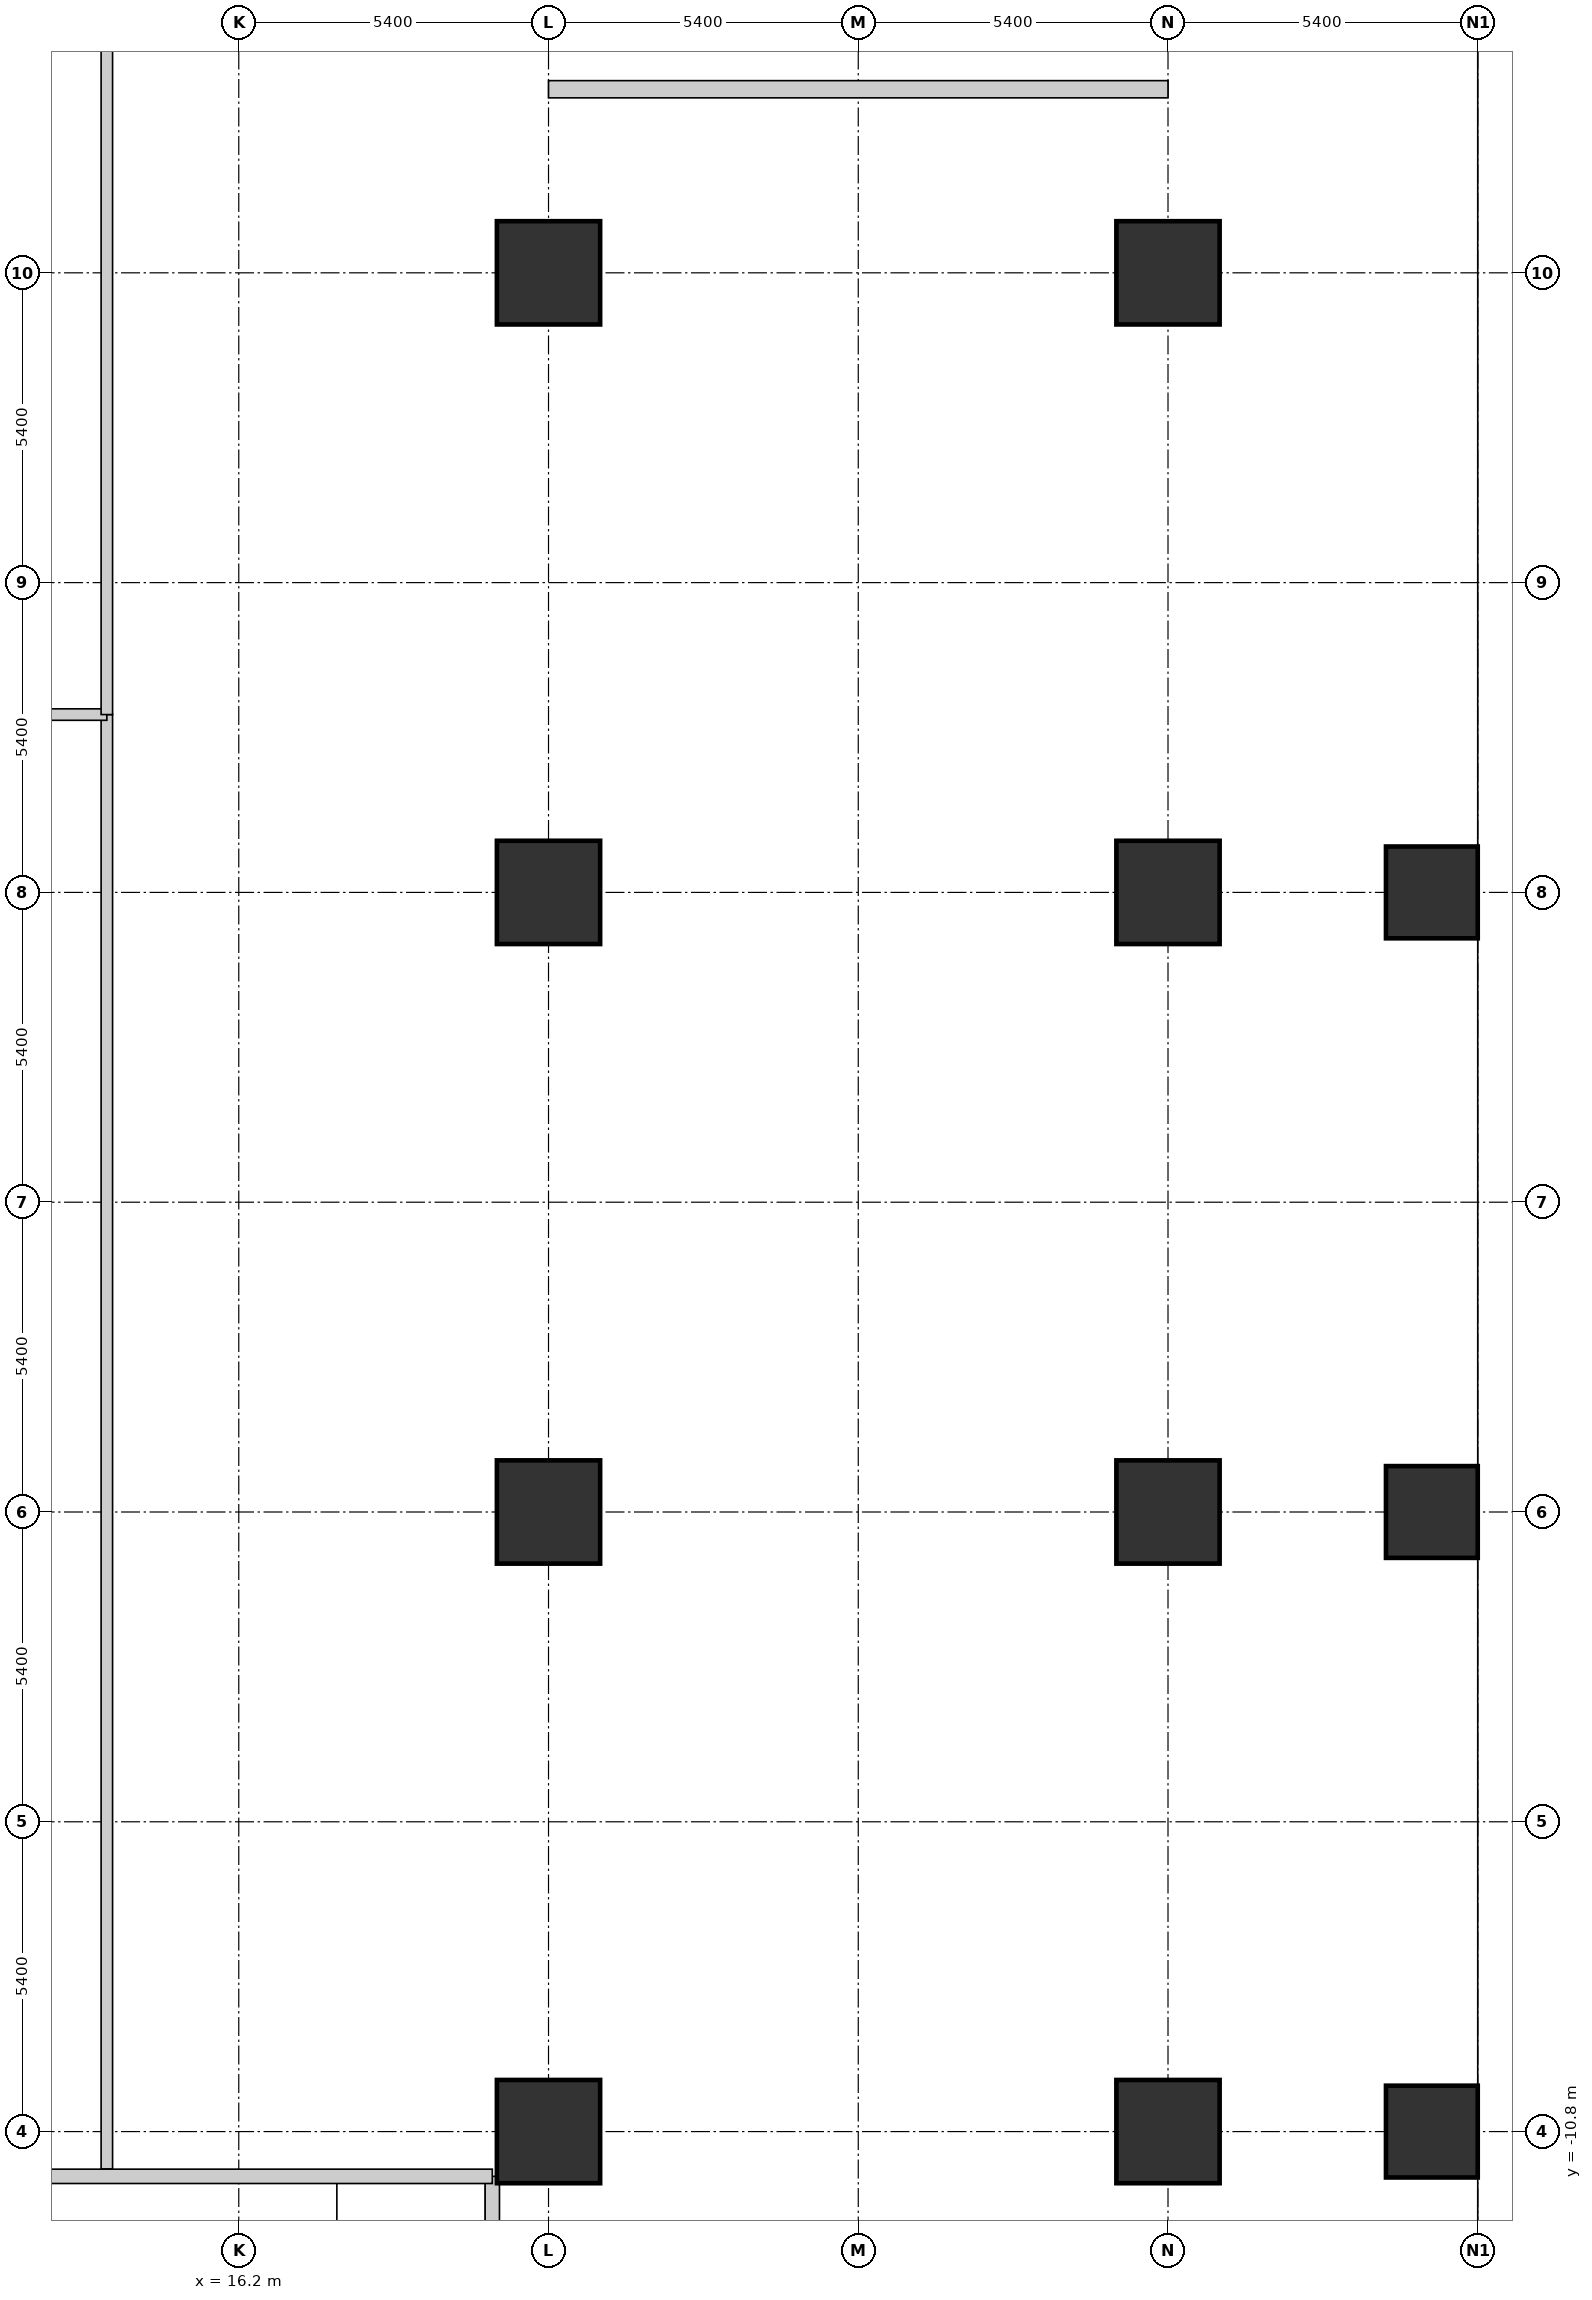
"""IFC4 building model, lengths in metres.
Left out: names, types, materials, properties, quantities, classifications, styles, units other than length and angle.
Written with IfcOpenShell. Run it as: python <this file> out.ifc"""

import sys

from ifc_helpers import new_model, si_unit, direction, frame, frame_2d, origin, origin_2d, place, context, subcontext, project, spatial, rectangle, circle, extrude, element, fill, save


model = new_model("IFC4")
c1 = context("Model", 3, precision=1e-05, world=origin(), true_north=direction((0.0, 1.0)))
c2 = subcontext(c1, "Body", "Model", "MODEL_VIEW")
j1 = project(units=[si_unit("LENGTHUNIT", "METRE"), si_unit("PLANEANGLEUNIT", "RADIAN")], contexts=[c1])
p1 = place(None, origin())
s1 = spatial("IfcSite", under=j1, at=p1, CompositionType="ELEMENT")
p2 = place(p1, origin())
s2 = spatial("IfcBuilding", under=s1, at=p2, CompositionType="ELEMENT")
p3 = place(p2, frame((0.0, 0.0, 9.0)))
s3 = spatial("IfcBuildingStorey", under=s2, at=p3, CompositionType="ELEMENT", Elevation=9.0)
for number, where, z_axis, x_axis in (
    (1, (21.6, -10.8, 0.0), (0.0, 0.0, 1.0), (1.0, 0.0, 0.0)),
    (2, (21.6, 0.0, 0.0), (0.0, 0.0, 1.0), (1.0, 0.0, 0.0)),
    (3, (21.6, 10.8, 0.0), (0.0, 0.0, 1.0), (1.0, 0.0, 0.0)),
    (4, (21.6, 21.6, 0.0), (0.0, 0.0, 1.0), (1.0, 0.0, 0.0)),
    (5, (32.4, -10.8, 0.0), (0.0, 0.0, 1.0), (1.0, 0.0, 0.0)),
    (6, (32.4, 0.0, 0.0), (0.0, 0.0, 1.0), (1.0, 0.0, 0.0)),
    (7, (32.4, 10.8, 0.0), (0.0, 0.0, 1.0), (1.0, 0.0, 0.0)),
    (8, (32.4, 21.6, 0.0), (0.0, 0.0, 1.0), (1.0, 0.0, 0.0)),
):
    element("IfcColumn", number, at=place(p3, frame(where, z_axis=z_axis, x_axis=x_axis)), inside=s3, PredefinedType="COLUMN", context=c2, shape_type="SweptSolid", body=[
        extrude(circle(Radius=0.9, at=origin_2d()), origin(), (0.0, 0.0, 1.0), 4.5),
    ])
for number, where, z_axis, x_axis in (
    (9, (37.0, -10.8, 0.0), (0.0, 0.0, 1.0), (1.0, 0.0, 0.0)),
    (10, (37.0, 0.0, 0.0), (0.0, 0.0, 1.0), (1.0, 0.0, 0.0)),
    (11, (37.0, 10.8, 0.0), (0.0, 0.0, 1.0), (1.0, 0.0, 0.0)),
):
    element("IfcColumn", number, at=place(p3, frame(where, z_axis=z_axis, x_axis=x_axis)), inside=s3, PredefinedType="COLUMN", context=c2, shape_type="SweptSolid", body=[
        extrude(rectangle(XDim=1.6, YDim=1.6, at=origin_2d()), origin(), (0.0, 0.0, 1.0), 4.5),
    ])
p4 = place(p3, frame((21.6, 24.8, 0.0), z_axis=(0.0, 0.0, 1.0), x_axis=(1.0, 0.0, 0.0)))
e12 = element("IfcWall", 12, at=p4, inside=s3, PredefinedType="STANDARD", context=c2, shape_type="SweptSolid", body=[
    extrude(rectangle(XDim=10.8, YDim=0.3, at=frame_2d((5.4, 0.0))), origin(), (0.0, 0.0, 1.0), 4.25),
])
p5 = place(p4, frame((4.35, 0.0, 0.85)))
e13 = element("IfcOpeningElement", 13, at=p5, cuts=e12, PredefinedType="OPENING", context=c2, shape_type="SweptSolid", body=[
    extrude(rectangle(XDim=2.1, YDim=1.8, at=frame_2d((1.05, 0.9))), frame((0.0, 0.16, 0.0), z_axis=(0.0, -1.0, 0.0), x_axis=(1.0, 0.0, 0.0)), (0.0, 0.0, 1.0), 0.32),
])
p6 = place(p3, frame((20.62, -15.52, 0.0), z_axis=(0.0, 0.0, 1.0), x_axis=(0.0, 1.0, 0.0)))
e14 = element("IfcWall", 14, at=p6, inside=s3, PredefinedType="SHEAR", context=c2, shape_type="SweptSolid", body=[
    extrude(rectangle(XDim=3.94, YDim=0.25, at=frame_2d((1.97, 0.0))), origin(), (0.0, 0.0, 1.0), 4.5),
])
p7 = place(p3, frame((12.68, -11.58, 0.0), z_axis=(0.0, 0.0, 1.0), x_axis=(1.0, 0.0, 0.0)))
e15 = element("IfcWall", 15, at=p7, inside=s3, PredefinedType="SHEAR", context=c2, shape_type="SweptSolid", body=[
    extrude(rectangle(XDim=7.94, YDim=0.25, at=frame_2d((3.97, 0.0))), origin(), (0.0, 0.0, 1.0), 4.5),
])
p8 = place(p3, frame((13.9, -11.45, 0.0), z_axis=(0.0, 0.0, 1.0), x_axis=(0.0, 1.0, 0.0)))
e16 = element("IfcWall", 16, at=p8, inside=s3, PredefinedType="PARTITIONING", context=c2, shape_type="SweptSolid", body=[
    extrude(rectangle(XDim=25.35, YDim=0.2, at=frame_2d((12.675, 0.0))), origin(), (0.0, 0.0, 1.0), 3.379),
])
p9 = place(p8, frame((10.0, 0.0, 0.0)))
e17 = element("IfcOpeningElement", 17, at=p9, cuts=e16, PredefinedType="OPENING", context=c2, shape_type="SweptSolid", body=[
    extrude(rectangle(XDim=1.1, YDim=2.1, at=frame_2d((0.55, 1.05))), frame((0.0, 0.11, 0.0), z_axis=(0.0, -1.0, 0.0), x_axis=(1.0, 0.0, 0.0)), (0.0, 0.0, 1.0), 0.22),
])
p10 = place(p3, frame((-13.9, 13.9, 0.0), z_axis=(0.0, 0.0, 1.0), x_axis=(1.0, 0.0, 0.0)))
e18 = element("IfcWall", 18, at=p10, inside=s3, PredefinedType="PARTITIONING", context=c2, shape_type="SweptSolid", body=[
    extrude(rectangle(XDim=27.8, YDim=0.2, at=frame_2d((13.9, 0.0))), origin(), (0.0, 0.0, 1.0), 3.379),
])
p11 = place(p10, frame((3.5, 0.0, 0.0)))
e19 = element("IfcOpeningElement", 19, at=p11, cuts=e18, PredefinedType="OPENING", context=c2, shape_type="SweptSolid", body=[
    extrude(rectangle(XDim=1.1, YDim=2.1, at=frame_2d((0.55, 1.05))), frame((0.0, 0.11, 0.0), z_axis=(0.0, -1.0, 0.0), x_axis=(1.0, 0.0, 0.0)), (0.0, 0.0, 1.0), 0.22),
])
p12 = place(p10, frame((21.0, 0.0, 0.0)))
e20 = element("IfcOpeningElement", 20, at=p12, cuts=e18, PredefinedType="OPENING", context=c2, shape_type="SweptSolid", body=[
    extrude(rectangle(XDim=1.1, YDim=2.1, at=frame_2d((0.55, 1.05))), frame((0.0, 0.11, 0.0), z_axis=(0.0, -1.0, 0.0), x_axis=(1.0, 0.0, 0.0)), (0.0, 0.0, 1.0), 0.22),
])
p13 = place(p3, frame((13.9, 13.9, 0.0), z_axis=(0.0, 0.0, 1.0), x_axis=(0.0, 1.0, 0.0)))
e21 = element("IfcWall", 21, at=p13, inside=s3, PredefinedType="PARTITIONING", context=c2, shape_type="SweptSolid", body=[
    extrude(rectangle(XDim=11.96, YDim=0.2, at=frame_2d((5.98, 0.0))), origin(), (0.0, 0.0, 1.0), 3.379),
])
p14 = place(p5, origin())
e22 = element("IfcWindow", 22, at=p14, inside=s3, PartitioningType="SINGLE_PANEL", PredefinedType="WINDOW", context=c2, shape_type="SweptSolid", body=[
    extrude(rectangle(XDim=2.1, YDim=1.8, at=frame_2d((1.05, 0.9))), frame((0.0, 0.03, 0.0), z_axis=(0.0, -1.0, 0.0), x_axis=(1.0, 0.0, 0.0)), (0.0, 0.0, 1.0), 0.06),
])
fill(e13, e22)
p15 = place(p9, origin())
e23 = element("IfcDoor", 23, at=p15, inside=s3, OperationType="SINGLE_SWING_RIGHT", PredefinedType="DOOR", context=c2, shape_type="SweptSolid", body=[
    extrude(rectangle(XDim=1.1, YDim=2.1, at=frame_2d((0.55, 1.05))), frame((0.0, 0.025, 0.0), z_axis=(0.0, -1.0, 0.0), x_axis=(1.0, 0.0, 0.0)), (0.0, 0.0, 1.0), 0.05),
])
fill(e17, e23)
save(model, sys.argv[1])
